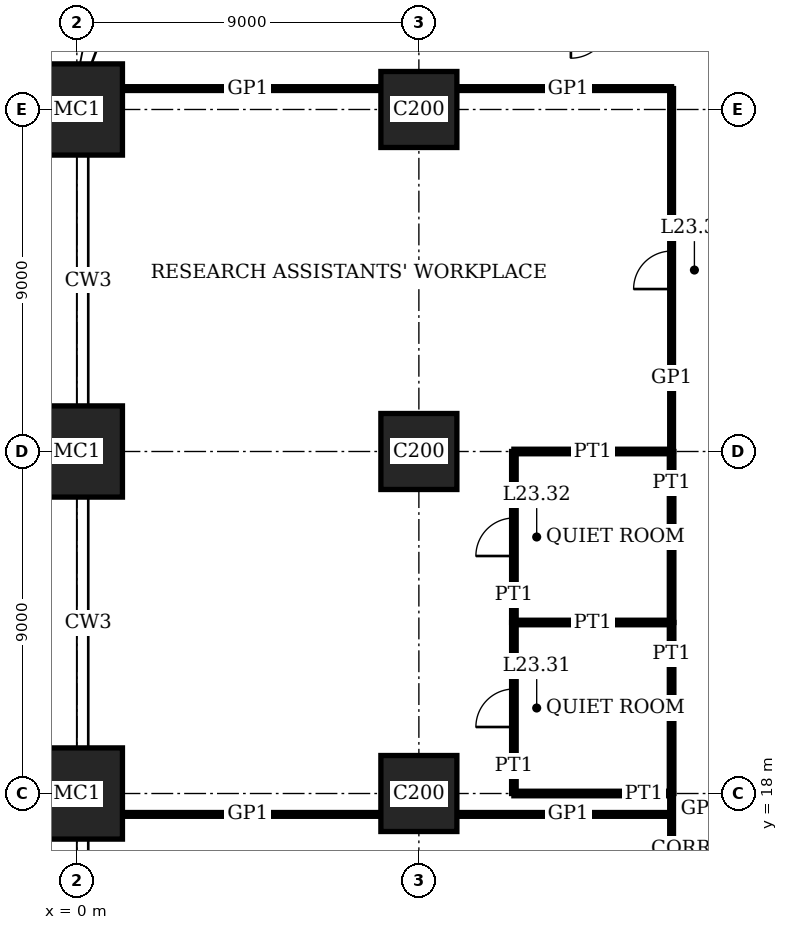
"""IFC4 building model, lengths in metres.
Left out: names, types, materials, properties, quantities, classifications, styles, units other than length and angle.
Written with IfcOpenShell. Run it as: python <this file> out.ifc"""

import sys

from ifc_helpers import new_model, si_unit, direction, frame, frame_2d, origin, origin_2d, place, context, subcontext, project, spatial, rectangle, extrude, element, fill, save


model = new_model("IFC4")
c1 = context("Model", 3, precision=1e-05, world=origin(), true_north=direction((0.0, 1.0)))
c2 = subcontext(c1, "Body", "Model", "MODEL_VIEW")
j1 = project(units=[si_unit("LENGTHUNIT", "METRE"), si_unit("PLANEANGLEUNIT", "RADIAN")], contexts=[c1])
p1 = place(None, origin())
s1 = spatial("IfcSite", under=j1, at=p1, CompositionType="ELEMENT")
p2 = place(p1, origin())
s2 = spatial("IfcBuilding", under=s1, at=p2, CompositionType="ELEMENT")
p3 = place(p2, frame((0.0, 0.0, 97.0)))
s3 = spatial("IfcBuildingStorey", under=s2, at=p3, CompositionType="ELEMENT", Elevation=97.0)
for number, where, z_axis, x_axis in (
    (1, (0.0, 18.0, 0.0), (0.0, 0.0, 1.0), (1.0, 0.0, 0.0)),
    (2, (0.0, 27.0, 0.0), (0.0, 0.0, 1.0), (1.0, 0.0, 0.0)),
    (3, (0.0, 36.0, 0.0), (0.0, 0.0, 1.0), (1.0, 0.0, 0.0)),
):
    element("IfcColumn", number, at=place(p3, frame(where, z_axis=z_axis, x_axis=x_axis)), inside=s3, PredefinedType="COLUMN", context=c2, shape_type="SweptSolid", body=[
        extrude(rectangle(XDim=2.4, YDim=2.4, at=origin_2d()), origin(), (0.0, 0.0, 1.0), 4.0),
    ])
for number, where, z_axis, x_axis in (
    (4, (9.0, 18.0, 0.0), (0.0, 0.0, 1.0), (1.0, 0.0, 0.0)),
    (5, (9.0, 27.0, 0.0), (0.0, 0.0, 1.0), (1.0, 0.0, 0.0)),
    (6, (9.0, 36.0, 0.0), (0.0, 0.0, 1.0), (1.0, 0.0, 0.0)),
):
    element("IfcColumn", number, at=place(p3, frame(where, z_axis=z_axis, x_axis=x_axis)), inside=s3, PredefinedType="COLUMN", context=c2, shape_type="SweptSolid", body=[
        extrude(rectangle(XDim=2.0, YDim=2.0, at=origin_2d()), origin(), (0.0, 0.0, 1.0), 4.0),
    ])
p4 = place(p3, frame((1.2, 17.45, 0.0), z_axis=(0.0, 0.0, 1.0), x_axis=(1.0, 0.0, 0.0)))
e7 = element("IfcWall", 7, at=p4, inside=s3, PredefinedType="PARTITIONING", context=c2, shape_type="SweptSolid", body=[
    extrude(rectangle(XDim=6.8, YDim=0.1, at=frame_2d((3.4, 0.0))), origin(), (0.0, 0.0, 1.0), 3.75),
])
p5 = place(p3, frame((10.0, 17.45, 0.0), z_axis=(0.0, 0.0, 1.0), x_axis=(1.0, 0.0, 0.0)))
e8 = element("IfcWall", 8, at=p5, inside=s3, PredefinedType="PARTITIONING", context=c2, shape_type="SweptSolid", body=[
    extrude(rectangle(XDim=5.65, YDim=0.1, at=frame_2d((2.825, 0.0))), origin(), (0.0, 0.0, 1.0), 3.75),
])
p6 = place(p3, frame((11.5, 18.0, 0.0), z_axis=(0.0, 0.0, 1.0), x_axis=(1.0, 0.0, 0.0)))
e9 = element("IfcWall", 9, at=p6, inside=s3, PredefinedType="PARTITIONING", context=c2, shape_type="SweptSolid", body=[
    extrude(rectangle(XDim=4.15, YDim=0.12, at=frame_2d((2.075, 0.0))), origin(), (0.0, 0.0, 1.0), 3.05),
])
p7 = place(p3, frame((11.5, 22.5, 0.0), z_axis=(0.0, 0.0, 1.0), x_axis=(1.0, 0.0, 0.0)))
e10 = element("IfcWall", 10, at=p7, inside=s3, PredefinedType="PARTITIONING", context=c2, shape_type="SweptSolid", body=[
    extrude(rectangle(XDim=4.15, YDim=0.12, at=frame_2d((2.075, 0.0))), origin(), (0.0, 0.0, 1.0), 3.1),
])
p8 = place(p3, frame((11.5, 27.0, 0.0), z_axis=(0.0, 0.0, 1.0), x_axis=(1.0, 0.0, 0.0)))
e11 = element("IfcWall", 11, at=p8, inside=s3, PredefinedType="PARTITIONING", context=c2, shape_type="SweptSolid", body=[
    extrude(rectangle(XDim=4.15, YDim=0.12, at=frame_2d((2.075, 0.0))), origin(), (0.0, 0.0, 1.0), 3.05),
])
p9 = place(p3, frame((1.2, 36.55, 0.0), z_axis=(0.0, 0.0, 1.0), x_axis=(1.0, 0.0, 0.0)))
e12 = element("IfcWall", 12, at=p9, inside=s3, PredefinedType="PARTITIONING", context=c2, shape_type="SweptSolid", body=[
    extrude(rectangle(XDim=6.8, YDim=0.1, at=frame_2d((3.4, 0.0))), origin(), (0.0, 0.0, 1.0), 3.75),
])
p10 = place(p3, frame((10.0, 36.55, 0.0), z_axis=(0.0, 0.0, 1.0), x_axis=(1.0, 0.0, 0.0)))
e13 = element("IfcWall", 13, at=p10, inside=s3, PredefinedType="PARTITIONING", context=c2, shape_type="SweptSolid", body=[
    extrude(rectangle(XDim=5.65, YDim=0.1, at=frame_2d((2.825, 0.0))), origin(), (0.0, 0.0, 1.0), 3.75),
])
p11 = place(p3, frame((11.5, 18.0, 0.0), z_axis=(0.0, 0.0, 1.0), x_axis=(0.0, 1.0, 0.0)))
e14 = element("IfcWall", 14, at=p11, inside=s3, PredefinedType="PARTITIONING", context=c2, shape_type="SweptSolid", body=[
    extrude(rectangle(XDim=4.5, YDim=0.12, at=frame_2d((2.25, 0.0))), origin(), (0.0, 0.0, 1.0), 3.75),
])
p12 = place(p11, frame((1.75, 0.0, 0.0)))
e15 = element("IfcOpeningElement", 15, at=p12, cuts=e14, PredefinedType="OPENING", context=c2, shape_type="SweptSolid", body=[
    extrude(rectangle(XDim=1.0, YDim=2.4, at=frame_2d((0.5, 1.2))), frame((0.0, 0.07, 0.0), z_axis=(0.0, -1.0, 0.0), x_axis=(1.0, 0.0, 0.0)), (0.0, 0.0, 1.0), 0.14),
])
p13 = place(p3, frame((11.5, 22.5, 0.0), z_axis=(0.0, 0.0, 1.0), x_axis=(0.0, 1.0, 0.0)))
e16 = element("IfcWall", 16, at=p13, inside=s3, PredefinedType="PARTITIONING", context=c2, shape_type="SweptSolid", body=[
    extrude(rectangle(XDim=4.5, YDim=0.12, at=frame_2d((2.25, 0.0))), origin(), (0.0, 0.0, 1.0), 3.75),
])
p14 = place(p13, frame((1.75, 0.0, 0.0)))
e17 = element("IfcOpeningElement", 17, at=p14, cuts=e16, PredefinedType="OPENING", context=c2, shape_type="SweptSolid", body=[
    extrude(rectangle(XDim=1.0, YDim=2.4, at=frame_2d((0.5, 1.2))), frame((0.0, 0.07, 0.0), z_axis=(0.0, -1.0, 0.0), x_axis=(1.0, 0.0, 0.0)), (0.0, 0.0, 1.0), 0.14),
])
for number, where, z_axis, x_axis in (
    (18, (15.65, 18.0, 0.0), (0.0, 0.0, 1.0), (0.0, 1.0, 0.0)),
    (19, (15.65, 22.5, 0.0), (0.0, 0.0, 1.0), (0.0, 1.0, 0.0)),
):
    element("IfcWall", number, at=place(p3, frame(where, z_axis=z_axis, x_axis=x_axis)), inside=s3, PredefinedType="PARTITIONING", context=c2, shape_type="SweptSolid", body=[
        extrude(rectangle(XDim=4.5, YDim=0.12, at=frame_2d((2.25, 0.0))), origin(), (0.0, 0.0, 1.0), 3.75),
    ])
p15 = place(p3, frame((15.65, 15.65, 0.0), z_axis=(0.0, 0.0, 1.0), x_axis=(0.0, 1.0, 0.0)))
e20 = element("IfcWall", 20, at=p15, inside=s3, PredefinedType="PARTITIONING", context=c2, shape_type="SweptSolid", body=[
    extrude(rectangle(XDim=2.35, YDim=0.1, at=frame_2d((1.175, 0.0))), origin(), (0.0, 0.0, 1.0), 3.75),
])
p16 = place(p3, frame((15.65, 27.0, 0.0), z_axis=(0.0, 0.0, 1.0), x_axis=(0.0, 1.0, 0.0)))
e21 = element("IfcWall", 21, at=p16, inside=s3, PredefinedType="PARTITIONING", context=c2, shape_type="SweptSolid", body=[
    extrude(rectangle(XDim=9.55, YDim=0.1, at=frame_2d((4.775, 0.0))), origin(), (0.0, 0.0, 1.0), 3.75),
])
p17 = place(p16, frame((4.275, 0.0, 0.0)))
e22 = element("IfcOpeningElement", 22, at=p17, cuts=e21, PredefinedType="OPENING", context=c2, shape_type="SweptSolid", body=[
    extrude(rectangle(XDim=1.0, YDim=2.4, at=frame_2d((0.5, 1.2))), frame((0.0, 0.06, 0.0), z_axis=(0.0, -1.0, 0.0), x_axis=(1.0, 0.0, 0.0)), (0.0, 0.0, 1.0), 0.12),
])
p18 = place(p12, origin())
e23 = element("IfcDoor", 23, at=p18, inside=s3, OperationType="SINGLE_SWING_RIGHT", PredefinedType="DOOR", context=c2, shape_type="SweptSolid", body=[
    extrude(rectangle(XDim=1.0, YDim=2.4, at=frame_2d((0.5, 1.2))), frame((0.0, 0.025, 0.0), z_axis=(0.0, -1.0, 0.0), x_axis=(1.0, 0.0, 0.0)), (0.0, 0.0, 1.0), 0.05),
])
fill(e15, e23)
p19 = place(p14, origin())
e24 = element("IfcDoor", 24, at=p19, inside=s3, OperationType="SINGLE_SWING_RIGHT", PredefinedType="DOOR", context=c2, shape_type="SweptSolid", body=[
    extrude(rectangle(XDim=1.0, YDim=2.4, at=frame_2d((0.5, 1.2))), frame((0.0, 0.025, 0.0), z_axis=(0.0, -1.0, 0.0), x_axis=(1.0, 0.0, 0.0)), (0.0, 0.0, 1.0), 0.05),
])
fill(e17, e24)
p20 = place(p17, origin())
e25 = element("IfcDoor", 25, at=p20, inside=s3, OperationType="SINGLE_SWING_RIGHT", PredefinedType="DOOR", context=c2, shape_type="SweptSolid", body=[
    extrude(rectangle(XDim=1.0, YDim=2.4, at=frame_2d((0.5, 1.2))), frame((0.0, 0.02, 0.0), z_axis=(0.0, -1.0, 0.0), x_axis=(1.0, 0.0, 0.0)), (0.0, 0.0, 1.0), 0.04),
])
fill(e22, e25)
save(model, sys.argv[1])
